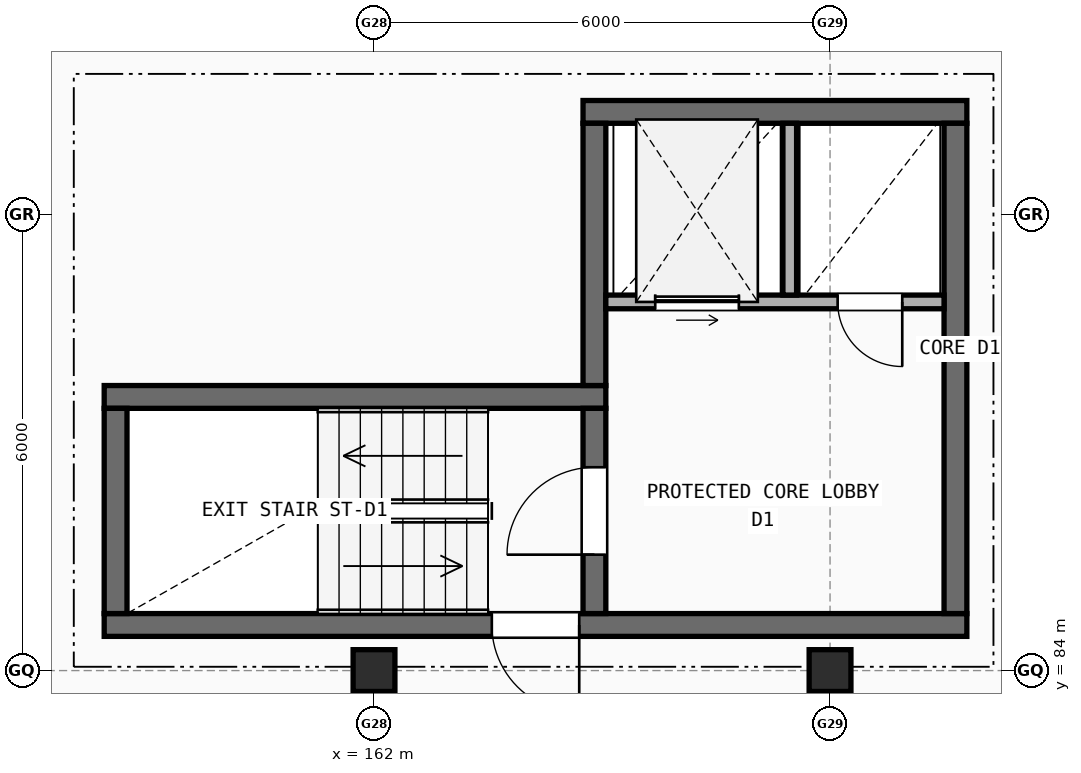
"""IFC4 building model, lengths in metres.
Left out: names, types, materials, properties, quantities, classifications, styles, units other than length and angle.
Written with IfcOpenShell. Run it as: python <this file> out.ifc"""

import sys

from ifc_helpers import new_model, si_unit, direction, frame, frame_2d, origin, origin_2d, place, context, subcontext, project, spatial, rectangle, extrude, element, fill, save


model = new_model("IFC4")
c1 = context("Model", 3, precision=1e-05, world=origin(), true_north=direction((0.0, 1.0)))
c2 = subcontext(c1, "Body", "Model", "MODEL_VIEW")
j1 = project(units=[si_unit("LENGTHUNIT", "METRE"), si_unit("PLANEANGLEUNIT", "RADIAN")], contexts=[c1])
p1 = place(None, origin())
s1 = spatial("IfcSite", under=j1, at=p1, CompositionType="ELEMENT")
p2 = place(p1, origin())
s2 = spatial("IfcBuilding", under=s1, at=p2, CompositionType="ELEMENT")
p3 = place(p2, frame((0.0, 0.0, 20.5)))
s3 = spatial("IfcBuildingStorey", under=s2, at=p3, CompositionType="ELEMENT", Elevation=20.5)
for number, where, z_axis, x_axis in (
    (1, (162.0, 84.0, 0.0), (0.0, 0.0, 1.0), (1.0, 0.0, 0.0)),
    (2, (168.0, 84.0, 0.0), (0.0, 0.0, 1.0), (1.0, 0.0, 0.0)),
):
    element("IfcColumn", number, at=place(p3, frame(where, z_axis=z_axis, x_axis=x_axis)), inside=s3, PredefinedType="COLUMN", context=c2, shape_type="SweptSolid", body=[
        extrude(rectangle(XDim=0.55, YDim=0.55, at=origin_2d()), origin(), (0.0, 0.0, 1.0), 2.97),
    ])
p4 = place(p3, frame((158.45, 84.6, 0.0), z_axis=(0.0, 0.0, 1.0), x_axis=(1.0, 0.0, 0.0)))
e3 = element("IfcWall", 3, at=p4, inside=s3, PredefinedType="SHEAR", context=c2, shape_type="SweptSolid", body=[
    extrude(rectangle(XDim=11.35, YDim=0.3, at=frame_2d((5.675, 0.0))), origin(), (0.0, 0.0, 1.0), 2.97),
])
p5 = place(p4, frame((5.1, 0.0, 0.0)))
e4 = element("IfcOpeningElement", 4, at=p5, cuts=e3, PredefinedType="OPENING", context=c2, shape_type="SweptSolid", body=[
    extrude(rectangle(XDim=1.15, YDim=2.15, at=frame_2d((0.575, 1.075))), frame((0.0, 0.16, 0.0), z_axis=(0.0, -1.0, 0.0), x_axis=(1.0, 0.0, 0.0)), (0.0, 0.0, 1.0), 0.32),
])
p6 = place(p3, frame((165.05, 87.6, 0.0), z_axis=(0.0, 0.0, 1.0), x_axis=(-1.0, 0.0, 0.0)))
e5 = element("IfcWall", 5, at=p6, inside=s3, PredefinedType="SHEAR", context=c2, shape_type="SweptSolid", body=[
    extrude(rectangle(XDim=6.6, YDim=0.3, at=frame_2d((3.3, 0.0))), origin(), (0.0, 0.0, 1.0), 2.97),
])
p7 = place(p3, frame((158.6, 87.45, 0.0), z_axis=(0.0, 0.0, 1.0), x_axis=(0.0, -1.0, 0.0)))
e6 = element("IfcWall", 6, at=p7, inside=s3, PredefinedType="SHEAR", context=c2, shape_type="SweptSolid", body=[
    extrude(rectangle(XDim=2.7, YDim=0.3, at=frame_2d((1.35, 0.0))), origin(), (0.0, 0.0, 1.0), 2.97),
])
p8 = place(p3, frame((164.9, 84.75, 0.0), z_axis=(0.0, 0.0, 1.0), x_axis=(0.0, 1.0, 0.0)))
e7 = element("IfcWall", 7, at=p8, inside=s3, PredefinedType="SHEAR", context=c2, shape_type="SweptSolid", body=[
    extrude(rectangle(XDim=2.7, YDim=0.3, at=frame_2d((1.35, 0.0))), origin(), (0.0, 0.0, 1.0), 2.97),
])
p9 = place(p8, frame((0.775, 0.0, 0.0)))
e8 = element("IfcOpeningElement", 8, at=p9, cuts=e7, PredefinedType="OPENING", context=c2, shape_type="SweptSolid", body=[
    extrude(rectangle(XDim=1.15, YDim=2.15, at=frame_2d((0.575, 1.075))), frame((0.0, 0.16, 0.0), z_axis=(0.0, -1.0, 0.0), x_axis=(1.0, 0.0, 0.0)), (0.0, 0.0, 1.0), 0.32),
])
p10 = place(p3, frame((169.8, 91.35, 0.0), z_axis=(0.0, 0.0, 1.0), x_axis=(-1.0, 0.0, 0.0)))
e9 = element("IfcWall", 9, at=p10, inside=s3, PredefinedType="SHEAR", context=c2, shape_type="SweptSolid", body=[
    extrude(rectangle(XDim=5.05, YDim=0.3, at=frame_2d((2.525, 0.0))), origin(), (0.0, 0.0, 1.0), 2.97),
])
p11 = place(p3, frame((169.65, 84.75, 0.0), z_axis=(0.0, 0.0, 1.0), x_axis=(0.0, 1.0, 0.0)))
e10 = element("IfcWall", 10, at=p11, inside=s3, PredefinedType="SHEAR", context=c2, shape_type="SweptSolid", body=[
    extrude(rectangle(XDim=6.45, YDim=0.3, at=frame_2d((3.225, 0.0))), origin(), (0.0, 0.0, 1.0), 2.97),
])
p12 = place(p3, frame((164.9, 87.75, 0.0), z_axis=(0.0, 0.0, 1.0), x_axis=(0.0, 1.0, 0.0)))
e11 = element("IfcWall", 11, at=p12, inside=s3, PredefinedType="SHEAR", context=c2, shape_type="SweptSolid", body=[
    extrude(rectangle(XDim=3.45, YDim=0.3, at=frame_2d((1.725, 0.0))), origin(), (0.0, 0.0, 1.0), 2.97),
])
p13 = place(p3, frame((165.05, 88.85, 0.0), z_axis=(0.0, 0.0, 1.0), x_axis=(1.0, 0.0, 0.0)))
e12 = element("IfcWall", 12, at=p13, inside=s3, PredefinedType="SOLIDWALL", context=c2, shape_type="SweptSolid", body=[
    extrude(rectangle(XDim=4.45, YDim=0.18, at=frame_2d((2.225, 0.0))), origin(), (0.0, 0.0, 1.0), 2.97),
])
p14 = place(p13, frame((0.65, 0.0, 0.0)))
e13 = element("IfcOpeningElement", 13, at=p14, cuts=e12, PredefinedType="OPENING", context=c2, shape_type="SweptSolid", body=[
    extrude(rectangle(XDim=1.1, YDim=2.15, at=frame_2d((0.55, 1.075))), frame((0.0, 0.1, 0.0), z_axis=(0.0, -1.0, 0.0), x_axis=(1.0, 0.0, 0.0)), (0.0, 0.0, 1.0), 0.2),
])
p15 = place(p13, frame((3.05, 0.0, 0.0)))
e14 = element("IfcOpeningElement", 14, at=p15, cuts=e12, PredefinedType="OPENING", context=c2, shape_type="SweptSolid", body=[
    extrude(rectangle(XDim=0.85, YDim=2.1, at=frame_2d((0.425, 1.05))), frame((0.0, 0.1, 0.0), z_axis=(0.0, -1.0, 0.0), x_axis=(1.0, 0.0, 0.0)), (0.0, 0.0, 1.0), 0.2),
])
p16 = place(p3, frame((167.47, 88.94, 0.0), z_axis=(0.0, 0.0, 1.0), x_axis=(0.0, 1.0, 0.0)))
e15 = element("IfcWall", 15, at=p16, inside=s3, PredefinedType="SOLIDWALL", context=c2, shape_type="SweptSolid", body=[
    extrude(rectangle(XDim=2.26, YDim=0.18, at=frame_2d((1.13, 0.0))), origin(), (0.0, 0.0, 1.0), 2.97),
])
p17 = place(p5, origin())
e16 = element("IfcDoor", 16, at=p17, inside=s3, OperationType="SINGLE_SWING_RIGHT", PredefinedType="DOOR", context=c2, shape_type="SweptSolid", body=[
    extrude(rectangle(XDim=1.15, YDim=2.15, at=frame_2d((0.575, 1.075))), frame((0.0, 0.025, 0.0), z_axis=(0.0, -1.0, 0.0), x_axis=(1.0, 0.0, 0.0)), (0.0, 0.0, 1.0), 0.05),
])
fill(e4, e16)
p18 = place(p9, origin())
e17 = element("IfcDoor", 17, at=p18, inside=s3, OperationType="SINGLE_SWING_LEFT", PredefinedType="DOOR", context=c2, shape_type="SweptSolid", body=[
    extrude(rectangle(XDim=1.15, YDim=2.15, at=frame_2d((0.575, 1.075))), frame((0.0, 0.025, 0.0), z_axis=(0.0, -1.0, 0.0), x_axis=(1.0, 0.0, 0.0)), (0.0, 0.0, 1.0), 0.05),
])
fill(e8, e17)
p19 = place(p14, origin())
e18 = element("IfcDoor", 18, at=p19, inside=s3, OperationType="SLIDING_TO_LEFT", PredefinedType="DOOR", context=c2, shape_type="SweptSolid", body=[
    extrude(rectangle(XDim=1.1, YDim=2.15, at=frame_2d((0.55, 1.075))), frame((0.0, 0.025, 0.0), z_axis=(0.0, -1.0, 0.0), x_axis=(1.0, 0.0, 0.0)), (0.0, 0.0, 1.0), 0.05),
])
fill(e13, e18)
p20 = place(p15, frame((0.85, 0.0, 0.0), z_axis=(0.0, 0.0, 1.0), x_axis=(-1.0, 0.0, 0.0)))
e19 = element("IfcDoor", 19, at=p20, inside=s3, OperationType="SINGLE_SWING_RIGHT", PredefinedType="DOOR", context=c2, shape_type="SweptSolid", body=[
    extrude(rectangle(XDim=0.85, YDim=2.1, at=frame_2d((0.425, 1.05))), frame((0.0, 0.025, 0.0), z_axis=(0.0, -1.0, 0.0), x_axis=(1.0, 0.0, 0.0)), (0.0, 0.0, 1.0), 0.05),
])
fill(e14, e19)
save(model, sys.argv[1])
